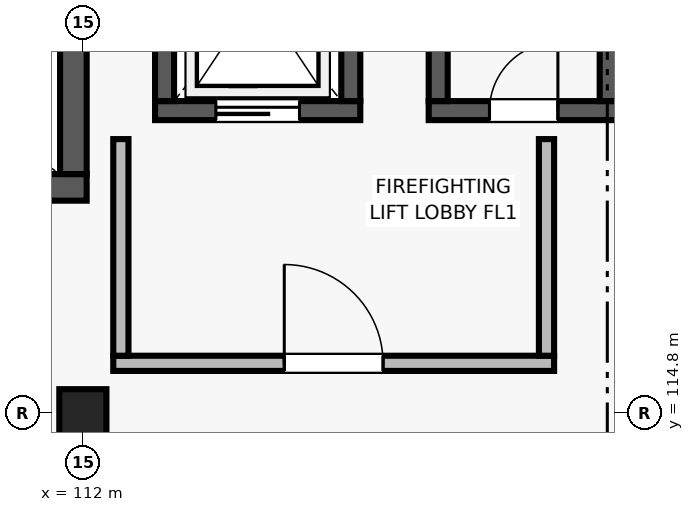
"""IFC4 building model, lengths in metres.
Left out: names, types, materials, properties, quantities, classifications, styles, units other than length and angle.
Written with IfcOpenShell. Run it as: python <this file> out.ifc"""

import sys

from ifc_helpers import new_model, si_unit, direction, frame, frame_2d, origin, origin_2d, place, context, subcontext, project, spatial, rectangle, extrude, element, fill, save


model = new_model("IFC4")
c1 = context("Model", 3, precision=1e-05, world=origin(), true_north=direction((0.0, 1.0)))
c2 = subcontext(c1, "Body", "Model", "MODEL_VIEW")
j1 = project(units=[si_unit("LENGTHUNIT", "METRE"), si_unit("PLANEANGLEUNIT", "RADIAN")], contexts=[c1])
p1 = place(None, origin())
s1 = spatial("IfcSite", under=j1, at=p1, CompositionType="ELEMENT")
p2 = place(p1, origin())
s2 = spatial("IfcBuilding", under=s1, at=p2, CompositionType="ELEMENT")
p3 = place(p2, frame((0.0, 0.0, 4.5)))
s3 = spatial("IfcBuildingStorey", under=s2, at=p3, CompositionType="ELEMENT", Elevation=4.5)
p4 = place(p3, frame((112.0, 114.8, 0.0), z_axis=(0.0, 0.0, 1.0), x_axis=(1.0, 0.0, 0.0)))
e1 = element("IfcColumn", 1, at=p4, inside=s3, PredefinedType="COLUMN", context=c2, shape_type="SweptSolid", body=[
    extrude(rectangle(XDim=0.62, YDim=0.62, at=origin_2d()), origin(), (0.0, 0.0, 1.0), 4.5),
])
p5 = place(p3, frame((103.95, 117.765, 0.0), z_axis=(0.0, 0.0, 1.0), x_axis=(1.0, 0.0, 0.0)))
e2 = element("IfcWall", 2, at=p5, inside=s3, PredefinedType="SHEAR", context=c2, shape_type="SweptSolid", body=[
    extrude(rectangle(XDim=8.1, YDim=0.35, at=frame_2d((4.05, 0.0))), origin(), (0.0, 0.0, 1.0), 4.22),
])
p6 = place(p5, frame((0.6, 0.0, 0.0)))
e3 = element("IfcOpeningElement", 3, at=p6, cuts=e2, PredefinedType="OPENING", context=c2, shape_type="SweptSolid", body=[
    extrude(rectangle(XDim=1.25, YDim=2.2, at=frame_2d((0.625, 1.1))), frame((0.0, 0.185, 0.0), z_axis=(0.0, -1.0, 0.0), x_axis=(1.0, 0.0, 0.0)), (0.0, 0.0, 1.0), 0.37),
])
p7 = place(p3, frame((111.875, 117.94, 0.0), z_axis=(0.0, 0.0, 1.0), x_axis=(0.0, 1.0, 0.0)))
e4 = element("IfcWall", 4, at=p7, inside=s3, PredefinedType="SHEAR", context=c2, shape_type="SweptSolid", body=[
    extrude(rectangle(XDim=3.76, YDim=0.35, at=frame_2d((1.88, 0.0))), origin(), (0.0, 0.0, 1.0), 4.22),
])
p8 = place(p3, frame((112.95, 118.775, 0.0), z_axis=(0.0, 0.0, 1.0), x_axis=(1.0, 0.0, 0.0)))
e5 = element("IfcWall", 5, at=p8, inside=s3, PredefinedType="SHEAR", context=c2, shape_type="SweptSolid", body=[
    extrude(rectangle(XDim=2.7, YDim=0.25, at=frame_2d((1.35, 0.0))), origin(), (0.0, 0.0, 1.0), 4.22),
])
p9 = place(p8, frame((0.8, 0.0, 0.0)))
e6 = element("IfcOpeningElement", 6, at=p9, cuts=e5, PredefinedType="OPENING", context=c2, shape_type="SweptSolid", body=[
    extrude(rectangle(XDim=1.1, YDim=2.15, at=frame_2d((0.55, 1.075))), frame((0.0, 0.135, 0.0), z_axis=(0.0, -1.0, 0.0), x_axis=(1.0, 0.0, 0.0)), (0.0, 0.0, 1.0), 0.27),
])
for number, where, z_axis, x_axis in (
    (7, (113.075, 118.9, 0.0), (0.0, 0.0, 1.0), (0.0, 1.0, 0.0)),
    (8, (115.525, 118.9, 0.0), (0.0, 0.0, 1.0), (0.0, 1.0, 0.0)),
):
    element("IfcWall", number, at=place(p3, frame(where, z_axis=z_axis, x_axis=x_axis)), inside=s3, PredefinedType="SHEAR", context=c2, shape_type="SweptSolid", body=[
        extrude(rectangle(XDim=2.8, YDim=0.25, at=frame_2d((1.4, 0.0))), origin(), (0.0, 0.0, 1.0), 4.22),
    ])
p10 = place(p3, frame((112.4, 115.45, 0.0), z_axis=(0.0, 0.0, 1.0), x_axis=(1.0, 0.0, 0.0)))
e9 = element("IfcWall", 9, at=p10, inside=s3, PredefinedType="SOLIDWALL", context=c2, shape_type="SweptSolid", body=[
    extrude(rectangle(XDim=5.8, YDim=0.2, at=frame_2d((2.9, 0.0))), origin(), (0.0, 0.0, 1.0), 4.22),
])
p11 = place(p10, frame((2.25, 0.0, 0.0)))
e10 = element("IfcOpeningElement", 10, at=p11, cuts=e9, PredefinedType="OPENING", context=c2, shape_type="SweptSolid", body=[
    extrude(rectangle(XDim=1.3, YDim=2.2, at=frame_2d((0.65, 1.1))), frame((0.0, 0.11, 0.0), z_axis=(0.0, -1.0, 0.0), x_axis=(1.0, 0.0, 0.0)), (0.0, 0.0, 1.0), 0.22),
])
for number, where, z_axis, x_axis in (
    (11, (112.5, 115.55, 0.0), (0.0, 0.0, 1.0), (0.0, 1.0, 0.0)),
    (12, (118.1, 115.55, 0.0), (0.0, 0.0, 1.0), (0.0, 1.0, 0.0)),
):
    element("IfcWall", number, at=place(p3, frame(where, z_axis=z_axis, x_axis=x_axis)), inside=s3, PredefinedType="SOLIDWALL", context=c2, shape_type="SweptSolid", body=[
        extrude(rectangle(XDim=2.85, YDim=0.2, at=frame_2d((1.425, 0.0))), origin(), (0.0, 0.0, 1.0), 4.22),
    ])
p12 = place(p3, frame((116.55, 118.775, 0.0), z_axis=(0.0, 0.0, 1.0), x_axis=(1.0, 0.0, 0.0)))
e13 = element("IfcWall", 13, at=p12, inside=s3, PredefinedType="SHEAR", context=c2, shape_type="SweptSolid", body=[
    extrude(rectangle(XDim=2.5, YDim=0.25, at=frame_2d((1.25, 0.0))), origin(), (0.0, 0.0, 1.0), 4.22),
])
p13 = place(p12, frame((0.8, 0.0, 0.0)))
e14 = element("IfcOpeningElement", 14, at=p13, cuts=e13, PredefinedType="OPENING", context=c2, shape_type="SweptSolid", body=[
    extrude(rectangle(XDim=0.9, YDim=2.05, at=frame_2d((0.45, 1.025))), frame((0.0, 0.135, 0.0), z_axis=(0.0, -1.0, 0.0), x_axis=(1.0, 0.0, 0.0)), (0.0, 0.0, 1.0), 0.27),
])
for number, where, z_axis, x_axis in (
    (15, (116.675, 118.9, 0.0), (0.0, 0.0, 1.0), (0.0, 1.0, 0.0)),
    (16, (118.925, 118.9, 0.0), (0.0, 0.0, 1.0), (0.0, 1.0, 0.0)),
):
    element("IfcWall", number, at=place(p3, frame(where, z_axis=z_axis, x_axis=x_axis)), inside=s3, PredefinedType="SHEAR", context=c2, shape_type="SweptSolid", body=[
        extrude(rectangle(XDim=2.8, YDim=0.25, at=frame_2d((1.4, 0.0))), origin(), (0.0, 0.0, 1.0), 4.22),
    ])
p14 = place(p11, origin())
e17 = element("IfcDoor", 17, at=p14, inside=s3, OperationType="SINGLE_SWING_LEFT", PredefinedType="DOOR", context=c2, shape_type="SweptSolid", body=[
    extrude(rectangle(XDim=1.3, YDim=2.2, at=frame_2d((0.65, 1.1))), frame((0.0, 0.025, 0.0), z_axis=(0.0, -1.0, 0.0), x_axis=(1.0, 0.0, 0.0)), (0.0, 0.0, 1.0), 0.05),
])
fill(e10, e17)
p15 = place(p13, origin())
e18 = element("IfcDoor", 18, at=p15, inside=s3, OperationType="SINGLE_SWING_RIGHT", PredefinedType="DOOR", context=c2, shape_type="SweptSolid", body=[
    extrude(rectangle(XDim=0.9, YDim=2.05, at=frame_2d((0.45, 1.025))), frame((0.0, 0.025, 0.0), z_axis=(0.0, -1.0, 0.0), x_axis=(1.0, 0.0, 0.0)), (0.0, 0.0, 1.0), 0.05),
])
fill(e14, e18)
p16 = place(p9, origin())
e19 = element("IfcDoor", 19, at=p16, inside=s3, OperationType="SLIDING_TO_LEFT", PredefinedType="DOOR", context=c2, shape_type="SweptSolid", body=[
    extrude(rectangle(XDim=1.1, YDim=2.15, at=frame_2d((0.55, 1.075))), frame((0.0, 0.025, 0.0), z_axis=(0.0, -1.0, 0.0), x_axis=(1.0, 0.0, 0.0)), (0.0, 0.0, 1.0), 0.05),
])
fill(e6, e19)
save(model, sys.argv[1])
